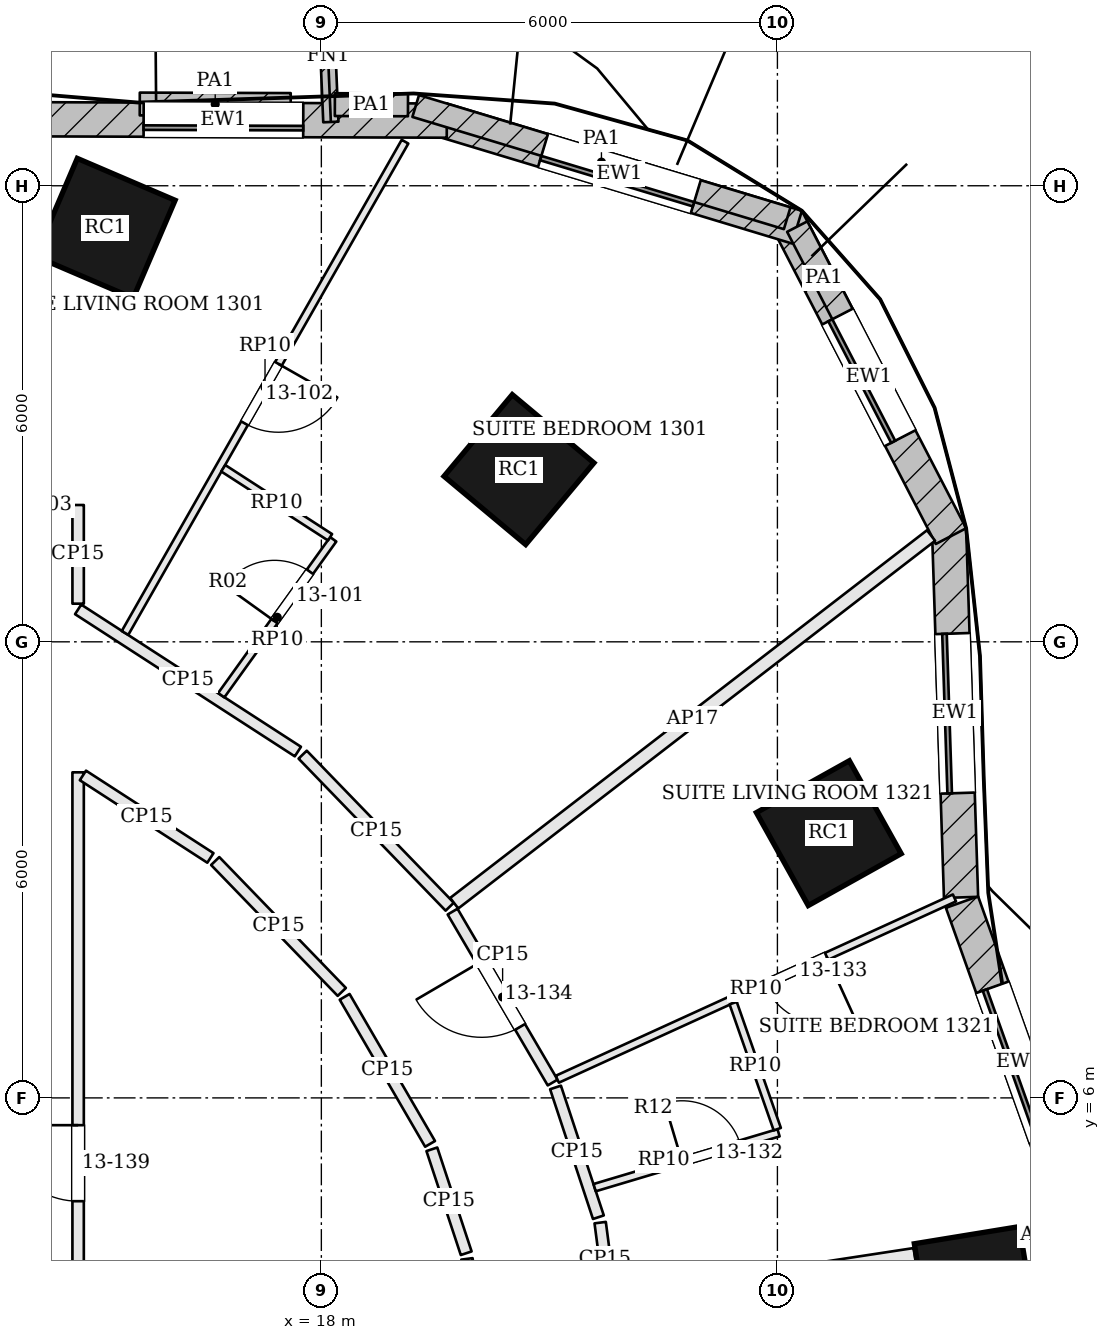
"""IFC4 building model, lengths in metres.
Left out: names, types, materials, properties, quantities, classifications, styles, units other than length and angle.
Written with IfcOpenShell. Run it as: python <this file> out.ifc"""

import sys

from ifc_helpers import new_model, si_unit, direction, frame, frame_2d, origin, origin_2d, place, context, subcontext, project, spatial, rectangle, extrude, element, fill, save


model = new_model("IFC4")
c1 = context("Model", 3, precision=1e-05, world=origin(), true_north=direction((0.0, 1.0)))
c2 = subcontext(c1, "Body", "Model", "MODEL_VIEW")
j1 = project(units=[si_unit("LENGTHUNIT", "METRE"), si_unit("PLANEANGLEUNIT", "RADIAN")], contexts=[c1])
p1 = place(None, origin())
s1 = spatial("IfcSite", under=j1, at=p1, CompositionType="ELEMENT")
p2 = place(p1, origin())
s2 = spatial("IfcBuilding", under=s1, at=p2, CompositionType="ELEMENT")
p3 = place(p2, frame((0.0, 0.0, 62.7)))
s3 = spatial("IfcBuildingStorey", under=s2, at=p3, CompositionType="ELEMENT", Elevation=62.7)
for number, where, z_axis, x_axis in (
    (1, (26.605, 3.503, 0.0), (0.0, 0.0, 1.0), (-0.161, 0.987, 0.0)),
    (2, (24.676, 9.483, 0.0), (0.0, 0.0, 1.0), (-0.487, 0.873, 0.0)),
    (3, (20.6, 14.266, 0.0), (0.0, 0.0, 1.0), (-0.767, 0.641, 0.0)),
    (4, (15.157, 17.441, 0.0), (0.0, 0.0, 1.0), (-0.919, 0.394, 0.0)),
):
    element("IfcColumn", number, at=place(p3, frame(where, z_axis=z_axis, x_axis=x_axis)), inside=s3, PredefinedType="COLUMN", context=c2, shape_type="SweptSolid", body=[
        extrude(rectangle(XDim=1.4, YDim=1.4, at=origin_2d()), origin(), (0.0, 0.0, 1.0), 3.6),
    ])
p4 = place(p3, frame((27.933, 4.356, 0.0), z_axis=(0.0, 0.0, 1.0), x_axis=(-0.335746005454, 0.941952557097, 0.0)))
e5 = element("IfcWall", 5, at=p4, inside=s3, PredefinedType="SOLIDWALL", context=c2, shape_type="SweptSolid", body=[
    extrude(rectangle(XDim=4.48, YDim=0.45, at=frame_2d((2.24, 0.0))), origin(), (0.0, 0.0, 1.0), 3.4),
])
p5 = place(p4, frame((1.19, 0.0, 0.9)))
e6 = element("IfcOpeningElement", 6, at=p5, cuts=e5, PredefinedType="OPENING", context=c2, shape_type="SweptSolid", body=[
    extrude(rectangle(XDim=2.1, YDim=2.0, at=frame_2d((1.05, 1.0))), frame((0.0, 0.235, 0.0), z_axis=(0.0, -1.0, 0.0), x_axis=(1.0, 0.0, 0.0)), (0.0, 0.0, 1.0), 0.47),
])
p6 = place(p3, frame((26.416, 8.638, 0.0), z_axis=(0.0, 0.0, 1.0), x_axis=(-0.03254979302, 0.999470115098, 0.0)))
e7 = element("IfcWall", 7, at=p6, inside=s3, PredefinedType="SOLIDWALL", context=c2, shape_type="SweptSolid", body=[
    extrude(rectangle(XDim=4.845, YDim=0.45, at=frame_2d((2.423, 0.0))), origin(), (0.0, 0.0, 1.0), 3.4),
])
p7 = place(p6, frame((1.373, 0.0, 0.9)))
e8 = element("IfcOpeningElement", 8, at=p7, cuts=e7, PredefinedType="OPENING", context=c2, shape_type="SweptSolid", body=[
    extrude(rectangle(XDim=2.1, YDim=2.0, at=frame_2d((1.05, 1.0))), frame((0.0, 0.235, 0.0), z_axis=(0.0, -1.0, 0.0), x_axis=(1.0, 0.0, 0.0)), (0.0, 0.0, 1.0), 0.47),
])
p8 = place(p3, frame((26.283, 13.391, 0.0), z_axis=(0.0, 0.0, 1.0), x_axis=(-0.459485057932, 0.888185499509, 0.0)))
e9 = element("IfcWall", 9, at=p8, inside=s3, PredefinedType="SOLIDWALL", context=c2, shape_type="SweptSolid", body=[
    extrude(rectangle(XDim=4.703, YDim=0.45, at=frame_2d((2.352, 0.0))), origin(), (0.0, 0.0, 1.0), 3.4),
])
p9 = place(p8, frame((1.451, 0.0, 0.9)))
e10 = element("IfcOpeningElement", 10, at=p9, cuts=e9, PredefinedType="OPENING", context=c2, shape_type="SweptSolid", body=[
    extrude(rectangle(XDim=1.8, YDim=2.0, at=frame_2d((0.9, 1.0))), frame((0.0, 0.235, 0.0), z_axis=(0.0, -1.0, 0.0), x_axis=(1.0, 0.0, 0.0)), (0.0, 0.0, 1.0), 0.47),
])
p10 = place(p3, frame((24.257, 17.456, 0.0), z_axis=(0.0, 0.0, 1.0), x_axis=(-0.957268138294, 0.289201852359, 0.0)))
e11 = element("IfcWall", 11, at=p10, inside=s3, PredefinedType="SOLIDWALL", context=c2, shape_type="SweptSolid", body=[
    extrude(rectangle(XDim=4.879, YDim=0.45, at=frame_2d((2.44, 0.0))), origin(), (0.0, 0.0, 1.0), 3.4),
])
p11 = place(p10, frame((1.39, 0.0, 0.9)))
e12 = element("IfcOpeningElement", 12, at=p11, cuts=e11, PredefinedType="OPENING", context=c2, shape_type="SweptSolid", body=[
    extrude(rectangle(XDim=2.1, YDim=2.0, at=frame_2d((1.05, 1.0))), frame((0.0, 0.235, 0.0), z_axis=(0.0, -1.0, 0.0), x_axis=(1.0, 0.0, 0.0)), (0.0, 0.0, 1.0), 0.47),
])
p12 = place(p3, frame((19.65, 18.857, 0.0), z_axis=(0.0, 0.0, 1.0), x_axis=(-0.999994750773, 0.003240127552, 0.0)))
e13 = element("IfcWall", 13, at=p12, inside=s3, PredefinedType="SOLIDWALL", context=c2, shape_type="SweptSolid", body=[
    extrude(rectangle(XDim=5.877, YDim=0.45, at=frame_2d((2.938, 0.0))), origin(), (0.0, 0.0, 1.0), 3.4),
])
p13 = place(p12, frame((1.889, 0.0, 0.9)))
e14 = element("IfcOpeningElement", 14, at=p13, cuts=e13, PredefinedType="OPENING", context=c2, shape_type="SweptSolid", body=[
    extrude(rectangle(XDim=2.1, YDim=2.0, at=frame_2d((1.05, 1.0))), frame((0.0, 0.235, 0.0), z_axis=(0.0, -1.0, 0.0), x_axis=(1.0, 0.0, 0.0)), (0.0, 0.0, 1.0), 0.47),
])
p14 = place(p3, frame((18.125, 18.839, 0.0), z_axis=(0.0, 0.0, 1.0), x_axis=(-0.042274699855, 0.999106025281, 0.0)))
e15 = element("IfcWall", 15, at=p14, inside=s3, PredefinedType="SOLIDWALL", context=c2, shape_type="SweptSolid", body=[
    extrude(rectangle(XDim=1.75, YDim=0.2, at=frame_2d((0.875, 0.0))), origin(), (0.0, 0.0, 1.0), 3.4),
])
p15 = place(p3, frame((24.965, 16.101, 3.6), z_axis=(0.0, 0.0, 1.0), x_axis=(-0.459461897951, 0.88819748048, 0.0)))
e16 = element("IfcWall", 16, at=p15, inside=s3, PredefinedType="PARAPET", context=c2, shape_type="SweptSolid", body=[
    extrude(rectangle(XDim=1.533, YDim=0.3, at=frame_2d((0.767, 0.0))), origin(), (0.0, 0.0, 1.0), 1.1),
])
p16 = place(p3, frame((24.128, 17.573, 3.6), z_axis=(0.0, 0.0, 1.0), x_axis=(-0.95727702005, 0.289172451806, 0.0)))
e17 = element("IfcWall", 17, at=p16, inside=s3, PredefinedType="PARAPET", context=c2, shape_type="SweptSolid", body=[
    extrude(rectangle(XDim=5.105, YDim=0.3, at=frame_2d((2.553, 0.0))), origin(), (0.0, 0.0, 1.0), 1.1),
])
p17 = place(p3, frame((19.14, 19.064, 3.6), z_axis=(0.0, 0.0, 1.0), x_axis=(-0.999994556719, 0.003299474426, 0.0)))
e18 = element("IfcWall", 18, at=p17, inside=s3, PredefinedType="PARAPET", context=c2, shape_type="SweptSolid", body=[
    extrude(rectangle(XDim=0.962, YDim=0.3, at=frame_2d((0.481, 0.0))), origin(), (0.0, 0.0, 1.0), 1.1),
])
p18 = place(p3, frame((17.596, 19.069, 3.6), z_axis=(0.0, 0.0, 1.0), x_axis=(-0.999994488127, 0.003320198128, 0.0)))
e19 = element("IfcWall", 19, at=p18, inside=s3, PredefinedType="PARAPET", context=c2, shape_type="SweptSolid", body=[
    extrude(rectangle(XDim=1.985, YDim=0.3, at=frame_2d((0.993, 0.0))), origin(), (0.0, 0.0, 1.0), 1.1),
])
p19 = place(p3, frame((19.689, 8.515, 0.0), z_axis=(0.0, 0.0, 1.0), x_axis=(-0.695251868619, 0.718766192292, 0.0)))
e20 = element("IfcWall", 20, at=p19, inside=s3, PredefinedType="PARTITIONING", context=c2, shape_type="SweptSolid", body=[
    extrude(rectangle(XDim=2.782, YDim=0.15, at=frame_2d((1.391, 0.0))), origin(), (0.0, 0.0, 1.0), 2.68),
])
p20 = place(p3, frame((17.691, 10.556, 0.0), z_axis=(0.0, 0.0, 1.0), x_axis=(-0.839564450265, 0.54326009779, 0.0)))
e21 = element("IfcWall", 21, at=p20, inside=s3, PredefinedType="PARTITIONING", context=c2, shape_type="SweptSolid", body=[
    extrude(rectangle(XDim=3.443, YDim=0.15, at=frame_2d((1.722, 0.0))), origin(), (0.0, 0.0, 1.0), 2.68),
])
p21 = place(p3, frame((14.8, 12.502, 0.0), z_axis=(0.0, 0.0, 1.0), x_axis=(-0.000188040613, 0.99999998232, 0.0)))
e22 = element("IfcWall", 22, at=p21, inside=s3, PredefinedType="PARTITIONING", context=c2, shape_type="SweptSolid", body=[
    extrude(rectangle(XDim=1.298, YDim=0.15, at=frame_2d((0.649, 0.0))), origin(), (0.0, 0.0, 1.0), 2.68),
])
p22 = place(p3, frame((14.725, 13.8, 0.0), z_axis=(0.0, 0.0, 1.0), x_axis=(-1.0, 0.0, 0.0)))
e23 = element("IfcWall", 23, at=p22, inside=s3, PredefinedType="PARTITIONING", context=c2, shape_type="SweptSolid", body=[
    extrude(rectangle(XDim=2.476, YDim=0.15, at=frame_2d((1.238, 0.0))), origin(), (0.0, 0.0, 1.0), 2.68),
])
p23 = place(p22, frame((0.45, 0.0, 0.0)))
e24 = element("IfcOpeningElement", 24, at=p23, cuts=e23, PredefinedType="OPENING", context=c2, shape_type="SweptSolid", body=[
    extrude(rectangle(XDim=1.0, YDim=2.1, at=frame_2d((0.5, 1.05))), frame((0.0, 0.085, 0.0), z_axis=(0.0, -1.0, 0.0), x_axis=(1.0, 0.0, 0.0)), (0.0, 0.0, 1.0), 0.17),
])
p24 = place(p3, frame((26.021, 13.398, 0.0), z_axis=(0.0, 0.0, 1.0), x_axis=(-0.791914254245, -0.610632306649, 0.0)))
e25 = element("IfcWall", 25, at=p24, inside=s3, PredefinedType="PARTITIONING", context=c2, shape_type="SweptSolid", body=[
    extrude(rectangle(XDim=7.922, YDim=0.175, at=frame_2d((3.961, 0.0))), origin(), (0.0, 0.0, 1.0), 2.68),
])
p25 = place(p3, frame((27.845, 4.249, 0.0), z_axis=(0.0, 0.0, 1.0), x_axis=(-0.988533937995, -0.15099885242, 0.0)))
e26 = element("IfcWall", 26, at=p25, inside=s3, PredefinedType="PARTITIONING", context=c2, shape_type="SweptSolid", body=[
    extrude(rectangle(XDim=0.624, YDim=0.175, at=frame_2d((0.312, 0.0))), origin(), (0.0, 0.0, 1.0), 2.68),
])
p26 = place(p3, frame((25.804, 3.938, 0.0), z_axis=(0.0, 0.0, 1.0), x_axis=(-0.988543004534, -0.150939485181, 0.0)))
e27 = element("IfcWall", 27, at=p26, inside=s3, PredefinedType="PARTITIONING", context=c2, shape_type="SweptSolid", body=[
    extrude(rectangle(XDim=3.972, YDim=0.175, at=frame_2d((1.986, 0.0))), origin(), (0.0, 0.0, 1.0), 2.68),
])
p27 = place(p3, frame((21.794, 3.401, 0.0), z_axis=(0.0, 0.0, 1.0), x_axis=(-0.129911835925, 0.991525549286, 0.0)))
e28 = element("IfcWall", 28, at=p27, inside=s3, PredefinedType="PARTITIONING", context=c2, shape_type="SweptSolid", body=[
    extrude(rectangle(XDim=0.966, YDim=0.15, at=frame_2d((0.483, 0.0))), origin(), (0.0, 0.0, 1.0), 2.68),
])
p28 = place(p3, frame((21.645, 4.43, 0.0), z_axis=(0.0, 0.0, 1.0), x_axis=(-0.313700743044, 0.949521902756, 0.0)))
e29 = element("IfcWall", 29, at=p28, inside=s3, PredefinedType="PARTITIONING", context=c2, shape_type="SweptSolid", body=[
    extrude(rectangle(XDim=1.798, YDim=0.15, at=frame_2d((0.899, 0.0))), origin(), (0.0, 0.0, 1.0), 2.68),
])
p29 = place(p3, frame((21.043, 6.202, 0.0), z_axis=(0.0, 0.0, 1.0), x_axis=(-0.50523366897, 0.862982583682, 0.0)))
e30 = element("IfcWall", 30, at=p29, inside=s3, PredefinedType="PARTITIONING", context=c2, shape_type="SweptSolid", body=[
    extrude(rectangle(XDim=2.605, YDim=0.15, at=frame_2d((1.303, 0.0))), origin(), (0.0, 0.0, 1.0), 2.68),
])
p30 = place(p29, frame((0.848, 0.0, 0.0)))
e31 = element("IfcOpeningElement", 31, at=p30, cuts=e30, PredefinedType="OPENING", context=c2, shape_type="SweptSolid", body=[
    extrude(rectangle(XDim=1.0, YDim=2.1, at=frame_2d((0.5, 1.05))), frame((0.0, 0.085, 0.0), z_axis=(0.0, -1.0, 0.0), x_axis=(1.0, 0.0, 0.0)), (0.0, 0.0, 1.0), 0.17),
])
p31 = place(p3, frame((16.604, 9.116, 0.0), z_axis=(0.0, 0.0, 1.0), x_axis=(0.695185405932, -0.718830474716, 0.0)))
e32 = element("IfcWall", 32, at=p31, inside=s3, PredefinedType="PARTITIONING", context=c2, shape_type="SweptSolid", body=[
    extrude(rectangle(XDim=2.396, YDim=0.15, at=frame_2d((1.198, 0.0))), origin(), (0.0, 0.0, 1.0), 2.68),
])
p32 = place(p3, frame((18.306, 7.329, 0.0), z_axis=(0.0, 0.0, 1.0), x_axis=(0.502425081691, -0.864620747662, 0.0)))
e33 = element("IfcWall", 33, at=p32, inside=s3, PredefinedType="PARTITIONING", context=c2, shape_type="SweptSolid", body=[
    extrude(rectangle(XDim=2.237, YDim=0.15, at=frame_2d((1.119, 0.0))), origin(), (0.0, 0.0, 1.0), 2.68),
])
p33 = place(p3, frame((19.454, 5.324, 0.0), z_axis=(0.0, 0.0, 1.0), x_axis=(0.313632756375, -0.949544361327, 0.0)))
e34 = element("IfcWall", 34, at=p33, inside=s3, PredefinedType="PARTITIONING", context=c2, shape_type="SweptSolid", body=[
    extrude(rectangle(XDim=1.44, YDim=0.15, at=frame_2d((0.72, 0.0))), origin(), (0.0, 0.0, 1.0), 2.68),
])
p34 = place(p3, frame((19.915, 3.882, 0.0), z_axis=(0.0, 0.0, 1.0), x_axis=(0.129945947446, -0.991521079323, 0.0)))
e35 = element("IfcWall", 35, at=p34, inside=s3, PredefinedType="PARTITIONING", context=c2, shape_type="SweptSolid", body=[
    extrude(rectangle(XDim=2.769, YDim=0.15, at=frame_2d((1.385, 0.0))), origin(), (0.0, 0.0, 1.0), 2.68),
])
p35 = place(p3, frame((14.8, -4.725, 0.0), z_axis=(0.0, 0.0, 1.0), x_axis=(0.0, 1.0, 0.0)))
e36 = element("IfcWall", 36, at=p35, inside=s3, PredefinedType="PARTITIONING", context=c2, shape_type="SweptSolid", body=[
    extrude(rectangle(XDim=15.008, YDim=0.15, at=frame_2d((7.504, 0.0))), origin(), (0.0, 0.0, 1.0), 2.68),
])
p36 = place(p35, frame((9.366, 0.0, 0.0)))
e37 = element("IfcOpeningElement", 37, at=p36, cuts=e36, PredefinedType="OPENING", context=c2, shape_type="SweptSolid", body=[
    extrude(rectangle(XDim=1.0, YDim=2.1, at=frame_2d((0.5, 1.05))), frame((0.0, 0.085, 0.0), z_axis=(0.0, -1.0, 0.0), x_axis=(1.0, 0.0, 0.0)), (0.0, 0.0, 1.0), 0.17),
])
p37 = place(p3, frame((14.863, 10.242, 0.0), z_axis=(0.0, 0.0, 1.0), x_axis=(0.839530811724, -0.543312079901, 0.0)))
e38 = element("IfcWall", 38, at=p37, inside=s3, PredefinedType="PARTITIONING", context=c2, shape_type="SweptSolid", body=[
    extrude(rectangle(XDim=1.998, YDim=0.15, at=frame_2d((0.999, 0.0))), origin(), (0.0, 0.0, 1.0), 2.68),
])
p38 = place(p3, frame((19.101, 18.58, 0.0), z_axis=(0.0, 0.0, 1.0), x_axis=(-0.49517728181, -0.868791954141, 0.0)))
e39 = element("IfcWall", 39, at=p38, inside=s3, PredefinedType="PARTITIONING", context=c2, shape_type="SweptSolid", body=[
    extrude(rectangle(XDim=7.439, YDim=0.1, at=frame_2d((3.719, 0.0))), origin(), (0.0, 0.0, 1.0), 2.68),
])
p39 = place(p38, frame((3.364, 0.0, 0.0)))
e40 = element("IfcOpeningElement", 40, at=p39, cuts=e39, PredefinedType="OPENING", context=c2, shape_type="SweptSolid", body=[
    extrude(rectangle(XDim=0.9, YDim=2.4, at=frame_2d((0.45, 1.2))), frame((0.0, 0.06, 0.0), z_axis=(0.0, -1.0, 0.0), x_axis=(1.0, 0.0, 0.0)), (0.0, 0.0, 1.0), 0.12),
])
p40 = place(p3, frame((16.683, 11.298, 0.0), z_axis=(0.0, 0.0, 1.0), x_axis=(0.583412891342, 0.812175718805, 0.0)))
e41 = element("IfcWall", 41, at=p40, inside=s3, PredefinedType="PARTITIONING", context=c2, shape_type="SweptSolid", body=[
    extrude(rectangle(XDim=2.525, YDim=0.1, at=frame_2d((1.263, 0.0))), origin(), (0.0, 0.0, 1.0), 2.68),
])
p41 = place(p40, frame((1.2, 0.0, 0.0)))
e42 = element("IfcOpeningElement", 42, at=p41, cuts=e41, PredefinedType="OPENING", context=c2, shape_type="SweptSolid", body=[
    extrude(rectangle(XDim=0.8, YDim=2.1, at=frame_2d((0.4, 1.05))), frame((0.0, 0.06, 0.0), z_axis=(0.0, -1.0, 0.0), x_axis=(1.0, 0.0, 0.0)), (0.0, 0.0, 1.0), 0.12),
])
p42 = place(p3, frame((18.114, 13.375, 0.0), z_axis=(0.0, 0.0, 1.0), x_axis=(-0.839848081289, 0.542821517955, 0.0)))
e43 = element("IfcWall", 43, at=p42, inside=s3, PredefinedType="PARTITIONING", context=c2, shape_type="SweptSolid", body=[
    extrude(rectangle(XDim=1.673, YDim=0.1, at=frame_2d((0.836, 0.0))), origin(), (0.0, 0.0, 1.0), 2.68),
])
p43 = place(p3, frame((26.329, 8.631, 0.0), z_axis=(0.0, 0.0, 1.0), x_axis=(-0.909688352961, -0.415291584899, 0.0)))
e44 = element("IfcWall", 44, at=p43, inside=s3, PredefinedType="PARTITIONING", context=c2, shape_type="SweptSolid", body=[
    extrude(rectangle(XDim=5.744, YDim=0.1, at=frame_2d((2.872, 0.0))), origin(), (0.0, 0.0, 1.0), 2.68),
])
p44 = place(p43, frame((1.85, 0.0, 0.0)))
e45 = element("IfcOpeningElement", 45, at=p44, cuts=e44, PredefinedType="OPENING", context=c2, shape_type="SweptSolid", body=[
    extrude(rectangle(XDim=0.9, YDim=2.4, at=frame_2d((0.45, 1.2))), frame((0.0, 0.06, 0.0), z_axis=(0.0, -1.0, 0.0), x_axis=(1.0, 0.0, 0.0)), (0.0, 0.0, 1.0), 0.12),
])
p45 = place(p3, frame((21.595, 4.819, 0.0), z_axis=(0.0, 0.0, 1.0), x_axis=(0.958232459865, 0.285990476872, 0.0)))
e46 = element("IfcWall", 46, at=p45, inside=s3, PredefinedType="PARTITIONING", context=c2, shape_type="SweptSolid", body=[
    extrude(rectangle(XDim=2.525, YDim=0.1, at=frame_2d((1.263, 0.0))), origin(), (0.0, 0.0, 1.0), 2.68),
])
p46 = place(p45, frame((1.2, 0.0, 0.0)))
e47 = element("IfcOpeningElement", 47, at=p46, cuts=e46, PredefinedType="OPENING", context=c2, shape_type="SweptSolid", body=[
    extrude(rectangle(XDim=0.8, YDim=2.1, at=frame_2d((0.4, 1.05))), frame((0.0, 0.06, 0.0), z_axis=(0.0, -1.0, 0.0), x_axis=(1.0, 0.0, 0.0)), (0.0, 0.0, 1.0), 0.12),
])
p47 = place(p3, frame((23.998, 5.588, 0.0), z_axis=(0.0, 0.0, 1.0), x_axis=(-0.33036280106, 0.943854024559, 0.0)))
e48 = element("IfcWall", 48, at=p47, inside=s3, PredefinedType="PARTITIONING", context=c2, shape_type="SweptSolid", body=[
    extrude(rectangle(XDim=1.757, YDim=0.1, at=frame_2d((0.879, 0.0))), origin(), (0.0, 0.0, 1.0), 2.68),
])
p48 = place(p5, origin())
e49 = element("IfcWindow", 49, at=p48, inside=s3, PartitioningType="SINGLE_PANEL", PredefinedType="WINDOW", context=c2, shape_type="SweptSolid", body=[
    extrude(rectangle(XDim=2.1, YDim=2.0, at=frame_2d((1.05, 1.0))), frame((0.0, 0.135, 0.0), z_axis=(0.0, -1.0, 0.0), x_axis=(1.0, 0.0, 0.0)), (0.0, 0.0, 1.0), 0.06),
])
fill(e6, e49)
p49 = place(p7, origin())
e50 = element("IfcWindow", 50, at=p49, inside=s3, PartitioningType="SINGLE_PANEL", PredefinedType="WINDOW", context=c2, shape_type="SweptSolid", body=[
    extrude(rectangle(XDim=2.1, YDim=2.0, at=frame_2d((1.05, 1.0))), frame((0.0, 0.135, 0.0), z_axis=(0.0, -1.0, 0.0), x_axis=(1.0, 0.0, 0.0)), (0.0, 0.0, 1.0), 0.06),
])
fill(e8, e50)
p50 = place(p9, origin())
e51 = element("IfcWindow", 51, at=p50, inside=s3, PartitioningType="SINGLE_PANEL", PredefinedType="WINDOW", context=c2, shape_type="SweptSolid", body=[
    extrude(rectangle(XDim=1.8, YDim=2.0, at=frame_2d((0.9, 1.0))), frame((0.0, 0.135, 0.0), z_axis=(0.0, -1.0, 0.0), x_axis=(1.0, 0.0, 0.0)), (0.0, 0.0, 1.0), 0.06),
])
fill(e10, e51)
p51 = place(p11, origin())
e52 = element("IfcWindow", 52, at=p51, inside=s3, PartitioningType="SINGLE_PANEL", PredefinedType="WINDOW", context=c2, shape_type="SweptSolid", body=[
    extrude(rectangle(XDim=2.1, YDim=2.0, at=frame_2d((1.05, 1.0))), frame((0.0, 0.135, 0.0), z_axis=(0.0, -1.0, 0.0), x_axis=(1.0, 0.0, 0.0)), (0.0, 0.0, 1.0), 0.06),
])
fill(e12, e52)
p52 = place(p13, origin())
e53 = element("IfcWindow", 53, at=p52, inside=s3, PartitioningType="SINGLE_PANEL", PredefinedType="WINDOW", context=c2, shape_type="SweptSolid", body=[
    extrude(rectangle(XDim=2.1, YDim=2.0, at=frame_2d((1.05, 1.0))), frame((0.0, 0.135, 0.0), z_axis=(0.0, -1.0, 0.0), x_axis=(1.0, 0.0, 0.0)), (0.0, 0.0, 1.0), 0.06),
])
fill(e14, e53)
p53 = place(p41, origin())
e54 = element("IfcDoor", 54, at=p53, inside=s3, OperationType="SINGLE_SWING_LEFT", PredefinedType="DOOR", context=c2, shape_type="SweptSolid", body=[
    extrude(rectangle(XDim=0.8, YDim=2.1, at=frame_2d((0.4, 1.05))), frame((0.0, 0.025, 0.0), z_axis=(0.0, -1.0, 0.0), x_axis=(1.0, 0.0, 0.0)), (0.0, 0.0, 1.0), 0.05),
])
fill(e42, e54)
p54 = place(p39, origin())
e55 = element("IfcDoor", 55, at=p54, inside=s3, OperationType="SINGLE_SWING_LEFT", PredefinedType="DOOR", context=c2, shape_type="SweptSolid", body=[
    extrude(rectangle(XDim=0.9, YDim=2.4, at=frame_2d((0.45, 1.2))), frame((0.0, 0.025, 0.0), z_axis=(0.0, -1.0, 0.0), x_axis=(1.0, 0.0, 0.0)), (0.0, 0.0, 1.0), 0.05),
])
fill(e40, e55)
p55 = place(p46, origin())
e56 = element("IfcDoor", 56, at=p55, inside=s3, OperationType="SINGLE_SWING_LEFT", PredefinedType="DOOR", context=c2, shape_type="SweptSolid", body=[
    extrude(rectangle(XDim=0.8, YDim=2.1, at=frame_2d((0.4, 1.05))), frame((0.0, 0.025, 0.0), z_axis=(0.0, -1.0, 0.0), x_axis=(1.0, 0.0, 0.0)), (0.0, 0.0, 1.0), 0.05),
])
fill(e47, e56)
p56 = place(p44, origin())
e57 = element("IfcDoor", 57, at=p56, inside=s3, OperationType="SINGLE_SWING_LEFT", PredefinedType="DOOR", context=c2, shape_type="SweptSolid", body=[
    extrude(rectangle(XDim=0.9, YDim=2.4, at=frame_2d((0.45, 1.2))), frame((0.0, 0.025, 0.0), z_axis=(0.0, -1.0, 0.0), x_axis=(1.0, 0.0, 0.0)), (0.0, 0.0, 1.0), 0.05),
])
fill(e45, e57)
p57 = place(p30, origin())
e58 = element("IfcDoor", 58, at=p57, inside=s3, OperationType="SINGLE_SWING_RIGHT", PredefinedType="DOOR", context=c2, shape_type="SweptSolid", body=[
    extrude(rectangle(XDim=1.0, YDim=2.1, at=frame_2d((0.5, 1.05))), frame((0.0, 0.025, 0.0), z_axis=(0.0, -1.0, 0.0), x_axis=(1.0, 0.0, 0.0)), (0.0, 0.0, 1.0), 0.05),
])
fill(e31, e58)
p58 = place(p36, origin())
e59 = element("IfcDoor", 59, at=p58, inside=s3, OperationType="SINGLE_SWING_RIGHT", PredefinedType="DOOR", context=c2, shape_type="SweptSolid", body=[
    extrude(rectangle(XDim=1.0, YDim=2.1, at=frame_2d((0.5, 1.05))), frame((0.0, 0.025, 0.0), z_axis=(0.0, -1.0, 0.0), x_axis=(1.0, 0.0, 0.0)), (0.0, 0.0, 1.0), 0.05),
])
fill(e37, e59)
save(model, sys.argv[1])
